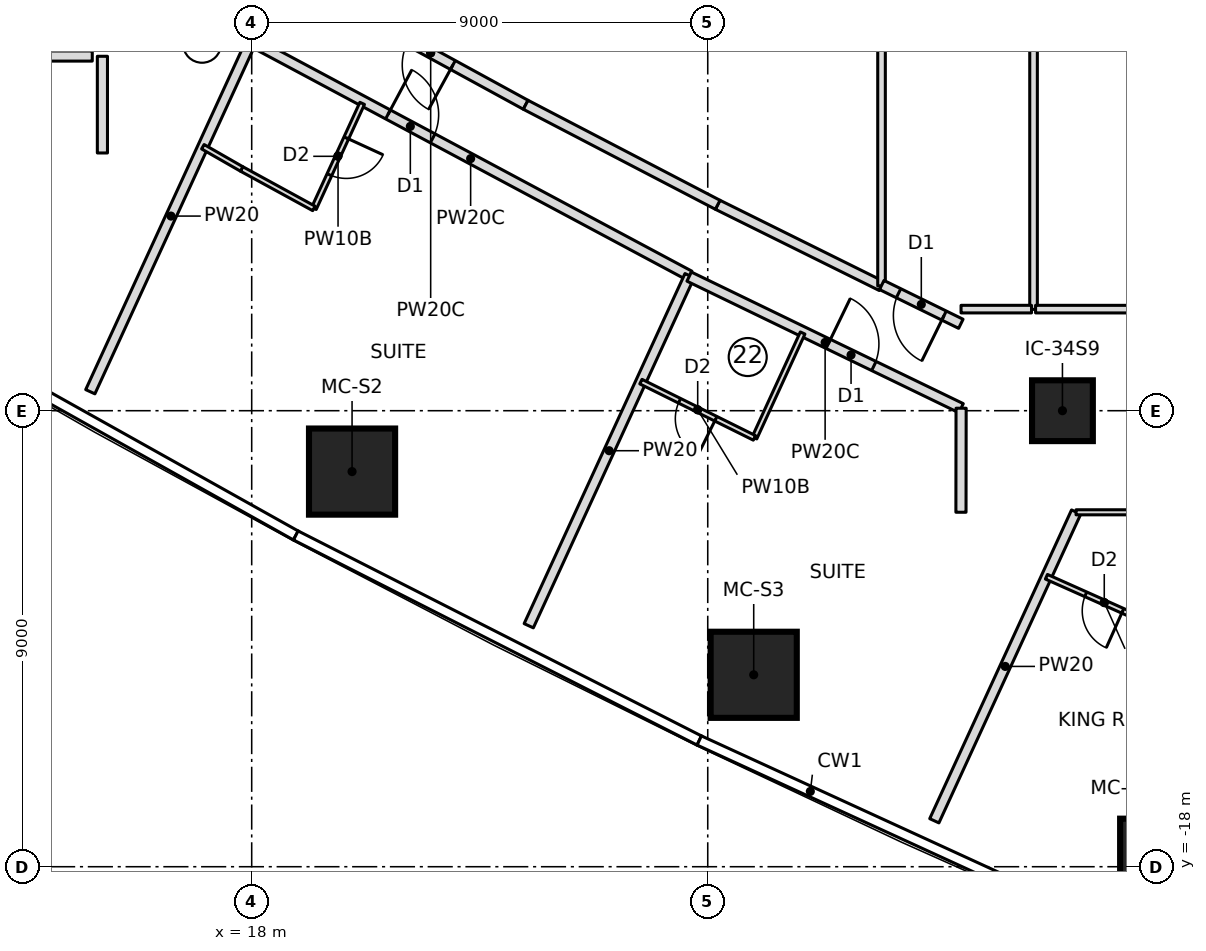
"""IFC4 building model, lengths in metres.
Left out: names, types, materials, properties, quantities, classifications, styles, units other than length and angle.
Written with IfcOpenShell. Run it as: python <this file> out.ifc"""

import sys

from ifc_helpers import new_model, si_unit, direction, frame, frame_2d, origin, origin_2d, place, context, subcontext, project, spatial, rectangle, extrude, element, fill, save


model = new_model("IFC4")
c1 = context("Model", 3, precision=1e-05, world=origin(), true_north=direction((0.0, 1.0)))
c2 = subcontext(c1, "Body", "Model", "MODEL_VIEW")
j1 = project(units=[si_unit("LENGTHUNIT", "METRE"), si_unit("PLANEANGLEUNIT", "RADIAN")], contexts=[c1])
p1 = place(None, origin())
s1 = spatial("IfcSite", under=j1, at=p1, CompositionType="ELEMENT")
p2 = place(p1, origin())
s2 = spatial("IfcBuilding", under=s1, at=p2, CompositionType="ELEMENT")
p3 = place(p2, frame((0.0, 0.0, 84.9)))
s3 = spatial("IfcBuildingStorey", under=s2, at=p3, CompositionType="ELEMENT", Elevation=84.9)
for number, where, z_axis, x_axis in (
    (1, (19.981, -10.202, 0.0), (0.0, 0.0, 1.0), (1.0, 0.0, 0.0)),
    (2, (27.907, -14.212, 0.0), (0.0, 0.0, 1.0), (1.0, 0.0, 0.0)),
    (3, (35.988, -17.902, 0.0), (0.0, 0.0, 1.0), (1.0, 0.0, 0.0)),
):
    element("IfcColumn", number, at=place(p3, frame(where, z_axis=z_axis, x_axis=x_axis)), inside=s3, PredefinedType="COLUMN", context=c2, shape_type="SweptSolid", body=[
        extrude(rectangle(XDim=1.7, YDim=1.7, at=origin_2d()), origin(), (0.0, 0.0, 1.0), 3.55),
    ])
p4 = place(p3, frame((34.0, -9.0, 0.0), z_axis=(0.0, 0.0, 1.0), x_axis=(1.0, 0.0, 0.0)))
e4 = element("IfcColumn", 4, at=p4, inside=s3, PredefinedType="COLUMN", context=c2, shape_type="SweptSolid", body=[
    extrude(rectangle(XDim=1.2, YDim=1.2, at=origin_2d()), origin(), (0.0, 0.0, 1.0), 3.55),
])
p5 = place(p3, frame((5.145, -2.0, 0.0), z_axis=(0.0, 0.0, 1.0), x_axis=(1.0, 0.0, 0.0)))
e5 = element("IfcWall", 5, at=p5, inside=s3, PredefinedType="PARTITIONING", context=c2, shape_type="SweptSolid", body=[
    extrude(rectangle(XDim=9.709, YDim=0.2, at=frame_2d((4.854, 0.0))), origin(), (0.0, 0.0, 1.0), 3.25),
])
p6 = place(p5, frame((4.625, 0.0, 0.0)))
e6 = element("IfcOpeningElement", 6, at=p6, cuts=e5, PredefinedType="OPENING", context=c2, shape_type="SweptSolid", body=[
    extrude(rectangle(XDim=1.0, YDim=2.1, at=frame_2d((0.5, 1.05))), frame((0.0, 0.11, 0.0), z_axis=(0.0, -1.0, 0.0), x_axis=(1.0, 0.0, 0.0)), (0.0, 0.0, 1.0), 0.22),
])
p7 = place(p3, frame((14.815, -8.626, 0.0), z_axis=(0.0, 0.0, 1.0), x_axis=(0.417432341259, 0.908708006166, 0.0)))
e7 = element("IfcWall", 7, at=p7, inside=s3, PredefinedType="PARTITIONING", context=c2, shape_type="SweptSolid", body=[
    extrude(rectangle(XDim=7.631, YDim=0.2, at=frame_2d((3.815, 0.0))), origin(), (0.0, 0.0, 1.0), 3.25),
])
p8 = place(p3, frame((18.0, -1.715, 0.0), z_axis=(0.0, 0.0, 1.0), x_axis=(0.881859333365, -0.471512583244, 0.0)))
e8 = element("IfcWall", 8, at=p8, inside=s3, PredefinedType="PARTITIONING", context=c2, shape_type="SweptSolid", body=[
    extrude(rectangle(XDim=9.799, YDim=0.2, at=frame_2d((4.899, 0.0))), origin(), (0.0, 0.0, 1.0), 3.25),
])
p9 = place(p8, frame((3.05, 0.0, 0.0)))
e9 = element("IfcOpeningElement", 9, at=p9, cuts=e8, PredefinedType="OPENING", context=c2, shape_type="SweptSolid", body=[
    extrude(rectangle(XDim=1.0, YDim=2.1, at=frame_2d((0.5, 1.05))), frame((0.0, 0.11, 0.0), z_axis=(0.0, -1.0, 0.0), x_axis=(1.0, 0.0, 0.0)), (0.0, 0.0, 1.0), 0.22),
])
p10 = place(p3, frame((20.18, -2.934, 0.0), z_axis=(0.0, 0.0, 1.0), x_axis=(-0.417450047292, -0.908699872354, 0.0)))
e10 = element("IfcWall", 10, at=p10, inside=s3, PredefinedType="PARTITIONING", context=c2, shape_type="SweptSolid", body=[
    extrude(rectangle(XDim=2.283, YDim=0.1, at=frame_2d((1.141, 0.0))), origin(), (0.0, 0.0, 1.0), 3.25),
])
p11 = place(p10, frame((0.75, 0.0, 0.0)))
e11 = element("IfcOpeningElement", 11, at=p11, cuts=e10, PredefinedType="OPENING", context=c2, shape_type="SweptSolid", body=[
    extrude(rectangle(XDim=0.8, YDim=2.1, at=frame_2d((0.4, 1.05))), frame((0.0, 0.06, 0.0), z_axis=(0.0, -1.0, 0.0), x_axis=(1.0, 0.0, 0.0)), (0.0, 0.0, 1.0), 0.12),
])
p12 = place(p3, frame((19.228, -5.008, 0.0), z_axis=(0.0, 0.0, 1.0), x_axis=(-0.877424481957, 0.479714788663, 0.0)))
e12 = element("IfcWall", 12, at=p12, inside=s3, PredefinedType="PARTITIONING", context=c2, shape_type="SweptSolid", body=[
    extrude(rectangle(XDim=1.625, YDim=0.1, at=frame_2d((0.813, 0.0))), origin(), (0.0, 0.0, 1.0), 3.25),
])
p13 = place(p3, frame((17.801, -4.229, 0.0), z_axis=(0.0, 0.0, 1.0), x_axis=(-0.867629162742, 0.497211862248, 0.0)))
e13 = element("IfcWall", 13, at=p13, inside=s3, PredefinedType="PARTITIONING", context=c2, shape_type="SweptSolid", body=[
    extrude(rectangle(XDim=0.882, YDim=0.1, at=frame_2d((0.441, 0.0))), origin(), (0.0, 0.0, 1.0), 3.25),
])
p14 = place(p3, frame((23.467, -13.244, 0.0), z_axis=(0.0, 0.0, 1.0), x_axis=(0.417455028008, 0.908697584233, 0.0)))
e14 = element("IfcWall", 14, at=p14, inside=s3, PredefinedType="PARTITIONING", context=c2, shape_type="SweptSolid", body=[
    extrude(rectangle(XDim=7.603, YDim=0.2, at=frame_2d((3.802, 0.0))), origin(), (0.0, 0.0, 1.0), 3.25),
])
p15 = place(p3, frame((26.633, -6.353, 0.0), z_axis=(0.0, 0.0, 1.0), x_axis=(0.900101763883, -0.435679715679, 0.0)))
e15 = element("IfcWall", 15, at=p15, inside=s3, PredefinedType="PARTITIONING", context=c2, shape_type="SweptSolid", body=[
    extrude(rectangle(XDim=5.963, YDim=0.2, at=frame_2d((2.981, 0.0))), origin(), (0.0, 0.0, 1.0), 3.25),
])
p16 = place(p15, frame((3.05, 0.0, 0.0)))
e16 = element("IfcOpeningElement", 16, at=p16, cuts=e15, PredefinedType="OPENING", context=c2, shape_type="SweptSolid", body=[
    extrude(rectangle(XDim=1.0, YDim=2.1, at=frame_2d((0.5, 1.05))), frame((0.0, 0.11, 0.0), z_axis=(0.0, -1.0, 0.0), x_axis=(1.0, 0.0, 0.0)), (0.0, 0.0, 1.0), 0.22),
])
p17 = place(p3, frame((28.873, -7.467, 0.0), z_axis=(0.0, 0.0, 1.0), x_axis=(-0.417433204355, -0.908707609686, 0.0)))
e17 = element("IfcWall", 17, at=p17, inside=s3, PredefinedType="PARTITIONING", context=c2, shape_type="SweptSolid", body=[
    extrude(rectangle(XDim=2.278, YDim=0.1, at=frame_2d((1.139, 0.0))), origin(), (0.0, 0.0, 1.0), 3.25),
])
p18 = place(p3, frame((27.922, -9.537, 0.0), z_axis=(0.0, 0.0, 1.0), x_axis=(-0.895944857815, 0.444165297784, 0.0)))
e18 = element("IfcWall", 18, at=p18, inside=s3, PredefinedType="PARTITIONING", context=c2, shape_type="SweptSolid", body=[
    extrude(rectangle(XDim=2.501, YDim=0.1, at=frame_2d((1.25, 0.0))), origin(), (0.0, 0.0, 1.0), 3.25),
])
p19 = place(p18, frame((0.85, 0.0, 0.0)))
e19 = element("IfcOpeningElement", 19, at=p19, cuts=e18, PredefinedType="OPENING", context=c2, shape_type="SweptSolid", body=[
    extrude(rectangle(XDim=0.8, YDim=2.1, at=frame_2d((0.4, 1.05))), frame((0.0, 0.06, 0.0), z_axis=(0.0, -1.0, 0.0), x_axis=(1.0, 0.0, 0.0)), (0.0, 0.0, 1.0), 0.12),
])
p20 = place(p3, frame((31.471, -17.094, 0.0), z_axis=(0.0, 0.0, 1.0), x_axis=(0.417420546123, 0.908713424394, 0.0)))
e20 = element("IfcWall", 20, at=p20, inside=s3, PredefinedType="PARTITIONING", context=c2, shape_type="SweptSolid", body=[
    extrude(rectangle(XDim=6.706, YDim=0.2, at=frame_2d((3.353, 0.0))), origin(), (0.0, 0.0, 1.0), 3.25),
])
p21 = place(p3, frame((35.967, -13.297, 0.0), z_axis=(0.0, 0.0, 1.0), x_axis=(-0.913016449487, 0.407922741417, 0.0)))
e21 = element("IfcWall", 21, at=p21, inside=s3, PredefinedType="PARTITIONING", context=c2, shape_type="SweptSolid", body=[
    extrude(rectangle(XDim=2.5, YDim=0.1, at=frame_2d((1.25, 0.0))), origin(), (0.0, 0.0, 1.0), 3.25),
])
p22 = place(p21, frame((0.85, 0.0, 0.0)))
e22 = element("IfcOpeningElement", 22, at=p22, cuts=e21, PredefinedType="OPENING", context=c2, shape_type="SweptSolid", body=[
    extrude(rectangle(XDim=0.8, YDim=2.1, at=frame_2d((0.4, 1.05))), frame((0.0, 0.06, 0.0), z_axis=(0.0, -1.0, 0.0), x_axis=(1.0, 0.0, 0.0)), (0.0, 0.0, 1.0), 0.12),
])
p23 = place(p3, frame((23.407, -2.962, 0.0), z_axis=(0.0, 0.0, 1.0), x_axis=(-0.877465075585, 0.479640533242, 0.0)))
e23 = element("IfcWall", 23, at=p23, inside=s3, PredefinedType="PARTITIONING", context=c2, shape_type="SweptSolid", body=[
    extrude(rectangle(XDim=4.273, YDim=0.2, at=frame_2d((2.137, 0.0))), origin(), (0.0, 0.0, 1.0), 3.25),
])
p24 = place(p23, frame((1.636, 0.0, 0.0)))
e24 = element("IfcOpeningElement", 24, at=p24, cuts=e23, PredefinedType="OPENING", context=c2, shape_type="SweptSolid", body=[
    extrude(rectangle(XDim=1.0, YDim=2.1, at=frame_2d((0.5, 1.05))), frame((0.0, 0.11, 0.0), z_axis=(0.0, -1.0, 0.0), x_axis=(1.0, 0.0, 0.0)), (0.0, 0.0, 1.0), 0.22),
])
p25 = place(p3, frame((30.43, -6.539, 0.0), z_axis=(0.0, 0.0, 1.0), x_axis=(-0.895964304417, 0.44412606905, 0.0)))
e25 = element("IfcWall", 25, at=p25, inside=s3, PredefinedType="PARTITIONING", context=c2, shape_type="SweptSolid", body=[
    extrude(rectangle(XDim=3.609, YDim=0.2, at=frame_2d((1.804, 0.0))), origin(), (0.0, 0.0, 1.0), 3.25),
])
p26 = place(p3, frame((27.196, -4.936, 0.0), z_axis=(0.0, 0.0, 1.0), x_axis=(-0.886899452904, 0.461962509775, 0.0)))
e26 = element("IfcWall", 26, at=p26, inside=s3, PredefinedType="PARTITIONING", context=c2, shape_type="SweptSolid", body=[
    extrude(rectangle(XDim=4.273, YDim=0.2, at=frame_2d((2.136, 0.0))), origin(), (0.0, 0.0, 1.0), 3.25),
])
p27 = place(p3, frame((30.43, -6.539, 0.0), z_axis=(0.0, 0.0, 1.0), x_axis=(0.0, 1.0, 0.0)))
e27 = element("IfcWall", 27, at=p27, inside=s3, PredefinedType="PARTITIONING", context=c2, shape_type="SweptSolid", body=[
    extrude(rectangle(XDim=13.077, YDim=0.15, at=frame_2d((6.539, 0.0))), origin(), (0.0, 0.0, 1.0), 3.25),
])
p28 = place(p3, frame((33.43, -7.0, 0.0), z_axis=(0.0, 0.0, 1.0), x_axis=(0.0, 1.0, 0.0)))
e28 = element("IfcWall", 28, at=p28, inside=s3, PredefinedType="PARTITIONING", context=c2, shape_type="SweptSolid", body=[
    extrude(rectangle(XDim=14.0, YDim=0.15, at=frame_2d((7.0, 0.0))), origin(), (0.0, 0.0, 1.0), 3.25),
])
p29 = place(p3, frame((31.995, -7.285, 0.0), z_axis=(0.0, 0.0, 1.0), x_axis=(-0.897771601508, 0.440461294015, 0.0)))
e29 = element("IfcWall", 29, at=p29, inside=s3, PredefinedType="PARTITIONING", context=c2, shape_type="SweptSolid", body=[
    extrude(rectangle(XDim=1.739, YDim=0.2, at=frame_2d((0.869, 0.0))), origin(), (0.0, 0.0, 1.0), 3.25),
])
p30 = place(p29, frame((0.369, 0.0, 0.0)))
e30 = element("IfcOpeningElement", 30, at=p30, cuts=e29, PredefinedType="OPENING", context=c2, shape_type="SweptSolid", body=[
    extrude(rectangle(XDim=1.0, YDim=2.1, at=frame_2d((0.5, 1.05))), frame((0.0, 0.11, 0.0), z_axis=(0.0, -1.0, 0.0), x_axis=(1.0, 0.0, 0.0)), (0.0, 0.0, 1.0), 0.22),
])
p31 = place(p3, frame((34.268, -11.005, 0.0), z_axis=(0.0, 0.0, 1.0), x_axis=(1.0, 0.0, 0.0)))
e31 = element("IfcWall", 31, at=p31, inside=s3, PredefinedType="PARTITIONING", context=c2, shape_type="SweptSolid", body=[
    extrude(rectangle(XDim=1.732, YDim=0.1, at=frame_2d((0.866, 0.0))), origin(), (0.0, 0.0, 1.0), 3.25),
])
p32 = place(p3, frame((33.39, -6.995, 0.0), z_axis=(0.0, 0.0, 1.0), x_axis=(-1.0, 0.0, 0.0)))
e32 = element("IfcWall", 32, at=p32, inside=s3, PredefinedType="PARTITIONING", context=c2, shape_type="SweptSolid", body=[
    extrude(rectangle(XDim=1.391, YDim=0.15, at=frame_2d((0.695, 0.0))), origin(), (0.0, 0.0, 1.0), 3.25),
])
p33 = place(p3, frame((35.963, -6.996, 0.0), z_axis=(0.0, 0.0, 1.0), x_axis=(-0.999999956849, 0.00029377202, 0.0)))
e33 = element("IfcWall", 33, at=p33, inside=s3, PredefinedType="PARTITIONING", context=c2, shape_type="SweptSolid", body=[
    extrude(rectangle(XDim=2.493, YDim=0.15, at=frame_2d((1.247, 0.0))), origin(), (0.0, 0.0, 1.0), 3.25),
])
p34 = place(p3, frame((15.054, -2.005, 0.0), z_axis=(0.0, 0.0, 1.0), x_axis=(0.0, -1.0, 0.0)))
e34 = element("IfcWall", 34, at=p34, inside=s3, PredefinedType="PARTITIONING", context=c2, shape_type="SweptSolid", body=[
    extrude(rectangle(XDim=1.908, YDim=0.2, at=frame_2d((0.954, 0.0))), origin(), (0.0, 0.0, 1.0), 3.25),
])
p35 = place(p3, frame((32.0, -8.951, 0.0), z_axis=(0.0, 0.0, 1.0), x_axis=(-0.001307965587, -0.999999144613, 0.0)))
e35 = element("IfcWall", 35, at=p35, inside=s3, PredefinedType="PARTITIONING", context=c2, shape_type="SweptSolid", body=[
    extrude(rectangle(XDim=2.053, YDim=0.2, at=frame_2d((1.027, 0.0))), origin(), (0.0, 0.0, 1.0), 3.25),
])
p36 = place(p11, origin())
e36 = element("IfcDoor", 36, at=p36, inside=s3, OperationType="SINGLE_SWING_LEFT", PredefinedType="DOOR", context=c2, shape_type="SweptSolid", body=[
    extrude(rectangle(XDim=0.8, YDim=2.1, at=frame_2d((0.4, 1.05))), frame((0.0, 0.025, 0.0), z_axis=(0.0, -1.0, 0.0), x_axis=(1.0, 0.0, 0.0)), (0.0, 0.0, 1.0), 0.05),
])
fill(e11, e36)
p37 = place(p9, origin())
e37 = element("IfcDoor", 37, at=p37, inside=s3, OperationType="SINGLE_SWING_LEFT", PredefinedType="DOOR", context=c2, shape_type="SweptSolid", body=[
    extrude(rectangle(XDim=1.0, YDim=2.1, at=frame_2d((0.5, 1.05))), frame((0.0, 0.025, 0.0), z_axis=(0.0, -1.0, 0.0), x_axis=(1.0, 0.0, 0.0)), (0.0, 0.0, 1.0), 0.05),
])
fill(e9, e37)
p38 = place(p19, origin())
e38 = element("IfcDoor", 38, at=p38, inside=s3, OperationType="SINGLE_SWING_LEFT", PredefinedType="DOOR", context=c2, shape_type="SweptSolid", body=[
    extrude(rectangle(XDim=0.8, YDim=2.1, at=frame_2d((0.4, 1.05))), frame((0.0, 0.025, 0.0), z_axis=(0.0, -1.0, 0.0), x_axis=(1.0, 0.0, 0.0)), (0.0, 0.0, 1.0), 0.05),
])
fill(e19, e38)
p39 = place(p16, origin())
e39 = element("IfcDoor", 39, at=p39, inside=s3, OperationType="SINGLE_SWING_LEFT", PredefinedType="DOOR", context=c2, shape_type="SweptSolid", body=[
    extrude(rectangle(XDim=1.0, YDim=2.1, at=frame_2d((0.5, 1.05))), frame((0.0, 0.025, 0.0), z_axis=(0.0, -1.0, 0.0), x_axis=(1.0, 0.0, 0.0)), (0.0, 0.0, 1.0), 0.05),
])
fill(e16, e39)
p40 = place(p22, origin())
e40 = element("IfcDoor", 40, at=p40, inside=s3, OperationType="SINGLE_SWING_LEFT", PredefinedType="DOOR", context=c2, shape_type="SweptSolid", body=[
    extrude(rectangle(XDim=0.8, YDim=2.1, at=frame_2d((0.4, 1.05))), frame((0.0, 0.025, 0.0), z_axis=(0.0, -1.0, 0.0), x_axis=(1.0, 0.0, 0.0)), (0.0, 0.0, 1.0), 0.05),
])
fill(e22, e40)
p41 = place(p24, origin())
e41 = element("IfcDoor", 41, at=p41, inside=s3, OperationType="SINGLE_SWING_RIGHT", PredefinedType="DOOR", context=c2, shape_type="SweptSolid", body=[
    extrude(rectangle(XDim=1.0, YDim=2.1, at=frame_2d((0.5, 1.05))), frame((0.0, 0.025, 0.0), z_axis=(0.0, -1.0, 0.0), x_axis=(1.0, 0.0, 0.0)), (0.0, 0.0, 1.0), 0.05),
])
fill(e24, e41)
p42 = place(p30, origin())
e42 = element("IfcDoor", 42, at=p42, inside=s3, OperationType="SINGLE_SWING_LEFT", PredefinedType="DOOR", context=c2, shape_type="SweptSolid", body=[
    extrude(rectangle(XDim=1.0, YDim=2.1, at=frame_2d((0.5, 1.05))), frame((0.0, 0.025, 0.0), z_axis=(0.0, -1.0, 0.0), x_axis=(1.0, 0.0, 0.0)), (0.0, 0.0, 1.0), 0.05),
])
fill(e30, e42)
save(model, sys.argv[1])
